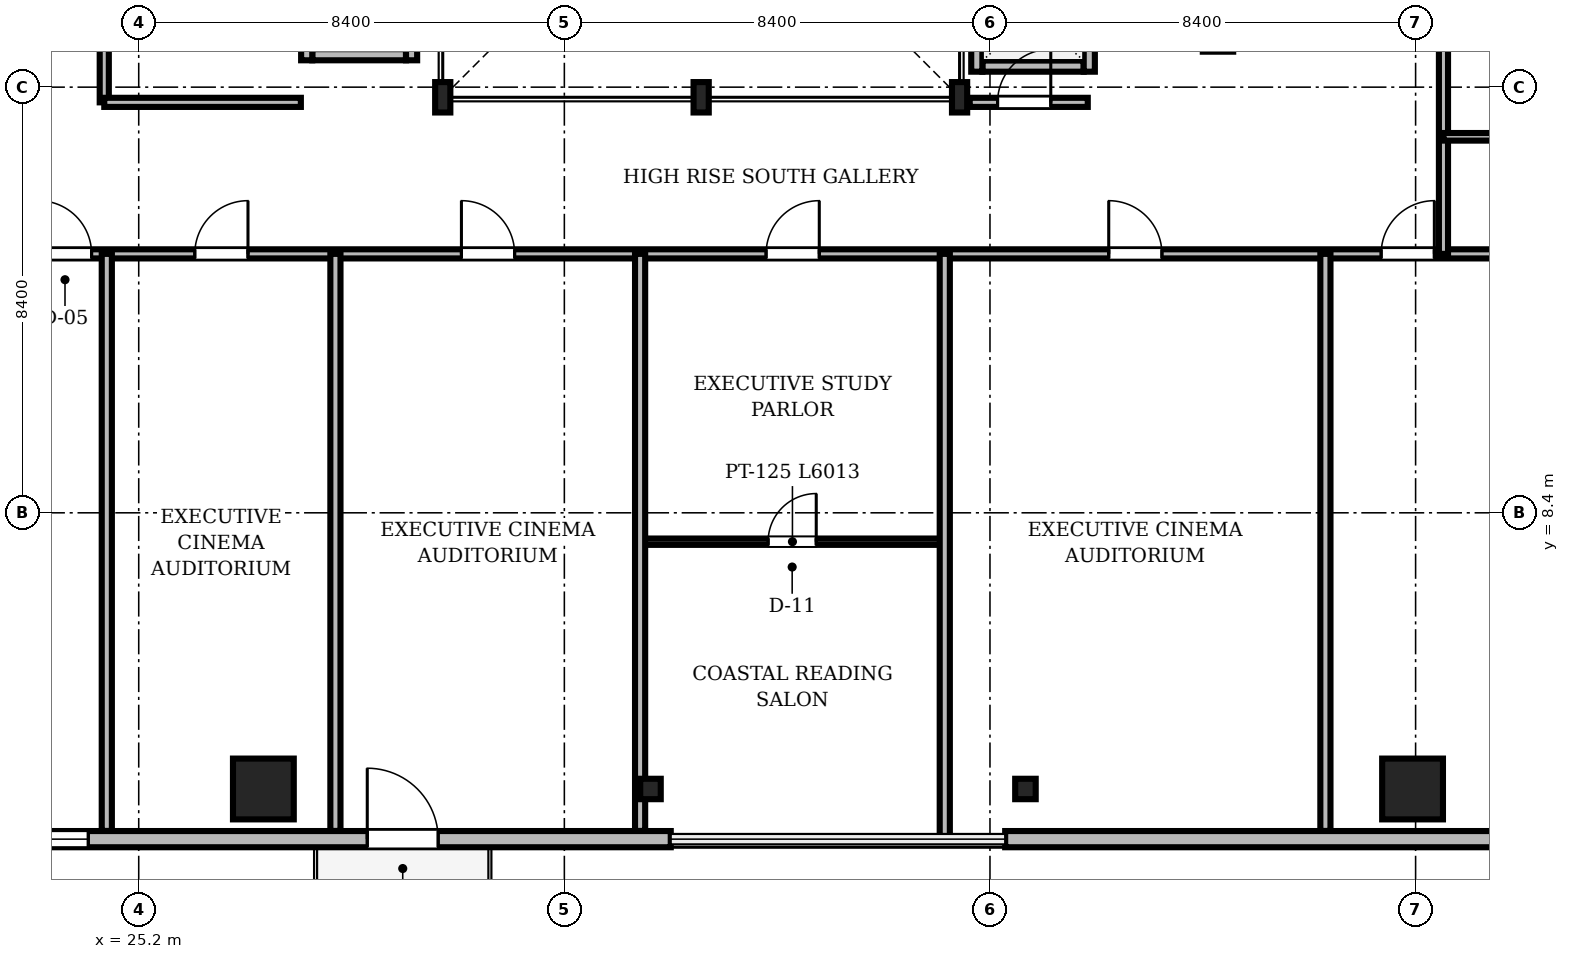
"""IFC4 building model, lengths in metres.
Left out: names, types, materials, properties, quantities, classifications, styles, units other than length and angle.
Written with IfcOpenShell. Run it as: python <this file> out.ifc"""

import sys

from ifc_helpers import new_model, si_unit, direction, frame, frame_2d, origin, origin_2d, place, context, subcontext, project, spatial, rectangle, i_section, extrude, source, transform, mapped, element, fill, save


model = new_model("IFC4")
c1 = context("Model", 3, precision=1e-05, world=origin(), true_north=direction((0.0, 1.0)))
c2 = subcontext(c1, "Body", "Model", "MODEL_VIEW")
j1 = project(units=[si_unit("LENGTHUNIT", "METRE"), si_unit("PLANEANGLEUNIT", "RADIAN")], contexts=[c1])
p1 = place(None, origin())
s1 = spatial("IfcSite", under=j1, at=p1, CompositionType="ELEMENT")
p2 = place(p1, origin())
s2 = spatial("IfcBuilding", under=s1, at=p2, CompositionType="ELEMENT")
p3 = place(p2, frame((0.0, 0.0, 250.6)))
s3 = spatial("IfcBuildingStorey", under=s2, at=p3, CompositionType="ELEMENT", Elevation=250.6)
m1 = source(origin(), c2, "Body", "SweptSolid", [
    extrude(i_section(OverallWidth=0.3, OverallDepth=0.6, WebThickness=0.015, FlangeThickness=0.03, FilletRadius=0.027, at=origin_2d()), origin(), (0.0, 0.0, 1.0), 3.65),
])
for number, where, z_axis, x_axis in (
    (1, (31.2, 16.6, 0.0), (0.0, 0.0, 1.0), (1.0, 0.0, 0.0)),
    (2, (36.3, 16.6, 0.0), (0.0, 0.0, 1.0), (1.0, 0.0, 0.0)),
    (3, (41.4, 16.6, 0.0), (0.0, 0.0, 1.0), (1.0, 0.0, 0.0)),
):
    element("IfcColumn", number, at=place(p3, frame(where, z_axis=z_axis, x_axis=x_axis)), inside=s3, PredefinedType="COLUMN", context=c2, shape_type="MappedRepresentation", body=[
        mapped(m1, transform((0.0, 0.0, 0.0), scale=1.0)),
    ])
m2 = source(origin(), c2, "Body", "SweptSolid", [
    extrude(rectangle(XDim=1.2, YDim=1.2, at=origin_2d()), origin(), (0.0, 0.0, 1.0), 3.65),
])
for number, where, z_axis, x_axis in (
    (4, (27.66, 2.95, 0.0), (0.0, 0.0, 1.0), (1.0, 0.0, 0.0)),
    (5, (50.34, 2.95, 0.0), (0.0, 0.0, 1.0), (1.0, 0.0, 0.0)),
):
    element("IfcColumn", number, at=place(p3, frame(where, z_axis=z_axis, x_axis=x_axis)), inside=s3, PredefinedType="COLUMN", context=c2, shape_type="MappedRepresentation", body=[
        mapped(m2, transform((0.0, 0.0, 0.0), scale=1.0)),
    ])
m3 = source(origin(), c2, "Body", "SweptSolid", [
    extrude(i_section(OverallWidth=0.405, OverallDepth=0.403, WebThickness=0.018, FlangeThickness=0.028, FilletRadius=0.015, at=origin_2d()), origin(), (0.0, 0.0, 1.0), 3.65),
])
for number, where, z_axis, x_axis in (
    (6, (35.3, 2.95, 0.0), (0.0, 0.0, 1.0), (1.0, 0.0, 0.0)),
    (7, (42.7, 2.95, 0.0), (0.0, 0.0, 1.0), (1.0, 0.0, 0.0)),
):
    element("IfcColumn", number, at=place(p3, frame(where, z_axis=z_axis, x_axis=x_axis)), inside=s3, PredefinedType="COLUMN", context=c2, shape_type="MappedRepresentation", body=[
        mapped(m3, transform((0.0, 0.0, 0.0), scale=1.0)),
    ])
m4 = source(origin(), c2, "Body", "SweptSolid", [
    extrude(rectangle(XDim=15.6, YDim=0.32, at=frame_2d((7.8, 0.0))), origin(), (0.0, 0.0, 1.0), 3.65),
])
p4 = place(p3, frame((20.1, 1.96, 0.0), z_axis=(0.0, 0.0, 1.0), x_axis=(1.0, 0.0, 0.0)))
e8 = element("IfcWall", 8, at=p4, inside=s3, PredefinedType="SOLIDWALL", context=c2, shape_type="MappedRepresentation", body=[
    mapped(m4, transform((0.0, 0.0, 0.0), scale=1.0)),
])
m5 = source(origin(), c2, "Body", "SweptSolid", [
    extrude(rectangle(XDim=1.4, YDim=2.3, at=frame_2d((0.7, 1.15))), frame((0.0, 0.17, 0.0), z_axis=(0.0, -1.0, 0.0), x_axis=(1.0, 0.0, 0.0)), (0.0, 0.0, 1.0), 0.34),
])
p5 = place(p4, frame((9.61, 0.0, 0.0)))
e9 = element("IfcOpeningElement", 9, at=p5, cuts=e8, PredefinedType="OPENING", context=c2, shape_type="MappedRepresentation", body=[
    mapped(m5, transform((0.0, 0.0, 0.0), scale=1.0)),
])
m6 = source(origin(), c2, "Body", "SweptSolid", [
    extrude(rectangle(XDim=1.8, YDim=2.4, at=frame_2d((0.9, 1.2))), frame((0.0, 0.17, 0.0), z_axis=(0.0, -1.0, 0.0), x_axis=(1.0, 0.0, 0.0)), (0.0, 0.0, 1.0), 0.34),
])
p6 = place(p4, frame((2.305, 0.0, 0.72)))
e10 = element("IfcOpeningElement", 10, at=p6, cuts=e8, PredefinedType="OPENING", context=c2, shape_type="MappedRepresentation", body=[
    mapped(m6, transform((0.0, 0.0, 0.0), scale=1.0)),
])
p7 = place(p3, frame((42.3, 1.96, 0.0), z_axis=(0.0, 0.0, 1.0), x_axis=(1.0, 0.0, 0.0)))
e11 = element("IfcWall", 11, at=p7, inside=s3, PredefinedType="SOLIDWALL", context=c2, shape_type="MappedRepresentation", body=[
    mapped(m4, transform((0.0, 0.0, 0.0), scale=1.0)),
])
p8 = place(p7, frame((10.595, 0.0, 0.72)))
e12 = element("IfcOpeningElement", 12, at=p8, cuts=e11, PredefinedType="OPENING", context=c2, shape_type="MappedRepresentation", body=[
    mapped(m6, transform((0.0, 0.0, 0.0), scale=1.0)),
])
m7 = source(origin(), c2, "Body", "SweptSolid", [
    extrude(rectangle(XDim=2.0, YDim=0.22, at=frame_2d((1.0, 0.0))), origin(), (0.0, 0.0, 1.0), 3.65),
])
p9 = place(p3, frame((41.85, 17.215, 0.0), z_axis=(0.0, 0.0, 1.0), x_axis=(1.0, 0.0, 0.0)))
e13 = element("IfcWall", 13, at=p9, inside=s3, PredefinedType="SOLIDWALL", context=c2, shape_type="MappedRepresentation", body=[
    mapped(m7, transform((0.0, 0.0, 0.0), scale=1.0)),
])
m8 = source(origin(), c2, "Body", "SweptSolid", [
    extrude(rectangle(XDim=2.19, YDim=0.22, at=frame_2d((1.095, 0.0))), origin(), (0.0, 0.0, 1.0), 3.65),
])
p10 = place(p3, frame((41.74, 17.105, 0.0), z_axis=(0.0, 0.0, 1.0), x_axis=(0.0, 1.0, 0.0)))
e14 = element("IfcWall", 14, at=p10, inside=s3, PredefinedType="SOLIDWALL", context=c2, shape_type="MappedRepresentation", body=[
    mapped(m8, transform((0.0, 0.0, 0.0), scale=1.0)),
])
p11 = place(p3, frame((43.96, 17.105, 0.0), z_axis=(0.0, 0.0, 1.0), x_axis=(0.0, 1.0, 0.0)))
e15 = element("IfcWall", 15, at=p11, inside=s3, PredefinedType="SOLIDWALL", context=c2, shape_type="MappedRepresentation", body=[
    mapped(m8, transform((0.0, 0.0, 0.0), scale=1.0)),
])
m9 = source(origin(), c2, "Body", "SweptSolid", [
    extrude(rectangle(XDim=1.1, YDim=2.2, at=frame_2d((0.55, 1.1))), frame((0.0, 0.12, 0.0), z_axis=(0.0, -1.0, 0.0), x_axis=(1.0, 0.0, 0.0)), (0.0, 0.0, 1.0), 0.24),
])
p12 = place(p11, frame((0.545, 0.0, 0.0)))
e16 = element("IfcOpeningElement", 16, at=p12, cuts=e15, PredefinedType="OPENING", context=c2, shape_type="MappedRepresentation", body=[
    mapped(m9, transform((0.0, 0.0, 0.0), scale=1.0)),
])
m10 = source(origin(), c2, "Body", "SweptSolid", [
    extrude(rectangle(XDim=1.85, YDim=0.22, at=frame_2d((0.925, 0.0))), origin(), (0.0, 0.0, 1.0), 3.65),
])
p13 = place(p3, frame((28.625, 17.44, 0.0), z_axis=(0.0, 0.0, 1.0), x_axis=(1.0, 0.0, 0.0)))
e17 = element("IfcWall", 17, at=p13, inside=s3, PredefinedType="SOLIDWALL", context=c2, shape_type="MappedRepresentation", body=[
    mapped(m10, transform((0.0, 0.0, 0.0), scale=1.0)),
])
m11 = source(origin(), c2, "Body", "SweptSolid", [
    extrude(rectangle(XDim=2.54, YDim=0.22, at=frame_2d((1.27, 0.0))), origin(), (0.0, 0.0, 1.0), 3.65),
])
for number, where, z_axis, x_axis in (
    (18, (28.515, 17.33, 0.0), (0.0, 0.0, 1.0), (0.0, 1.0, 0.0)),
    (19, (30.585, 17.33, 0.0), (0.0, 0.0, 1.0), (0.0, 1.0, 0.0)),
):
    element("IfcWall", number, at=place(p3, frame(where, z_axis=z_axis, x_axis=x_axis)), inside=s3, PredefinedType="SOLIDWALL", context=c2, shape_type="MappedRepresentation", body=[
        mapped(m11, transform((0.0, 0.0, 0.0), scale=1.0)),
    ])
m12 = source(origin(), c2, "Body", "SweptSolid", [
    extrude(rectangle(XDim=46.156, YDim=0.18, at=frame_2d((23.078, 0.0))), origin(), (0.0, 0.0, 1.0), 2.892),
])
p14 = place(p3, frame((15.922, 13.51, 0.0), z_axis=(0.0, 0.0, 1.0), x_axis=(1.0, 0.0, 0.0)))
e20 = element("IfcWall", 20, at=p14, inside=s3, PredefinedType="PARTITIONING", context=c2, shape_type="MappedRepresentation", body=[
    mapped(m12, transform((0.0, 0.0, 0.0), scale=1.0)),
])
m13 = source(origin(), c2, "Body", "SweptSolid", [
    extrude(rectangle(XDim=1.05, YDim=2.2, at=frame_2d((0.525, 1.1))), frame((0.0, 0.1, 0.0), z_axis=(0.0, -1.0, 0.0), x_axis=(1.0, 0.0, 0.0)), (0.0, 0.0, 1.0), 0.2),
])
p15 = place(p14, frame((7.298, 0.0, 0.0)))
e21 = element("IfcOpeningElement", 21, at=p15, cuts=e20, PredefinedType="OPENING", context=c2, shape_type="MappedRepresentation", body=[
    mapped(m13, transform((0.0, 0.0, 0.0), scale=1.0)),
])
p16 = place(p14, frame((10.384, 0.0, 0.0)))
e22 = element("IfcOpeningElement", 22, at=p16, cuts=e20, PredefinedType="OPENING", context=c2, shape_type="MappedRepresentation", body=[
    mapped(m13, transform((0.0, 0.0, 0.0), scale=1.0)),
])
p17 = place(p14, frame((15.647, 0.0, 0.0)))
e23 = element("IfcOpeningElement", 23, at=p17, cuts=e20, PredefinedType="OPENING", context=c2, shape_type="MappedRepresentation", body=[
    mapped(m13, transform((0.0, 0.0, 0.0), scale=1.0)),
])
p18 = place(p14, frame((21.659, 0.0, 0.0)))
e24 = element("IfcOpeningElement", 24, at=p18, cuts=e20, PredefinedType="OPENING", context=c2, shape_type="MappedRepresentation", body=[
    mapped(m13, transform((0.0, 0.0, 0.0), scale=1.0)),
])
p19 = place(p14, frame((28.422, 0.0, 0.0)))
e25 = element("IfcOpeningElement", 25, at=p19, cuts=e20, PredefinedType="OPENING", context=c2, shape_type="MappedRepresentation", body=[
    mapped(m13, transform((0.0, 0.0, 0.0), scale=1.0)),
])
p20 = place(p14, frame((33.798, 0.0, 0.0)))
e26 = element("IfcOpeningElement", 26, at=p20, cuts=e20, PredefinedType="OPENING", context=c2, shape_type="MappedRepresentation", body=[
    mapped(m13, transform((0.0, 0.0, 0.0), scale=1.0)),
])
m14 = source(origin(), c2, "Body", "SweptSolid", [
    extrude(rectangle(XDim=27.59, YDim=0.18, at=frame_2d((13.795, 0.0))), origin(), (0.0, 0.0, 1.0), 3.092),
])
p21 = place(p3, frame((50.95, 13.51, 0.0), z_axis=(0.0, 0.0, 1.0), x_axis=(0.0, 1.0, 0.0)))
e27 = element("IfcWall", 27, at=p21, inside=s3, PredefinedType="PARTITIONING", context=c2, shape_type="MappedRepresentation", body=[
    mapped(m14, transform((0.0, 0.0, 0.0), scale=1.0)),
])
p22 = place(p21, frame((4.086, 0.0, 0.0)))
e28 = element("IfcOpeningElement", 28, at=p22, cuts=e27, PredefinedType="OPENING", context=c2, shape_type="MappedRepresentation", body=[
    mapped(m13, transform((0.0, 0.0, 0.0), scale=1.0)),
])
p23 = place(p21, frame((9.744, 0.0, 0.0)))
e29 = element("IfcOpeningElement", 29, at=p23, cuts=e27, PredefinedType="OPENING", context=c2, shape_type="MappedRepresentation", body=[
    mapped(m13, transform((0.0, 0.0, 0.0), scale=1.0)),
])
p24 = place(p21, frame((17.771, 0.0, 0.0)))
e30 = element("IfcOpeningElement", 30, at=p24, cuts=e27, PredefinedType="OPENING", context=c2, shape_type="MappedRepresentation", body=[
    mapped(m13, transform((0.0, 0.0, 0.0), scale=1.0)),
])
p25 = place(p21, frame((24.614, 0.0, 0.0)))
e31 = element("IfcOpeningElement", 31, at=p25, cuts=e27, PredefinedType="OPENING", context=c2, shape_type="MappedRepresentation", body=[
    mapped(m13, transform((0.0, 0.0, 0.0), scale=1.0)),
])
m15 = source(origin(), c2, "Body", "SweptSolid", [
    extrude(rectangle(XDim=6.013, YDim=0.125, at=frame_2d((3.006, 0.0))), origin(), (0.0, 0.0, 1.0), 3.092),
])
p26 = place(p3, frame((35.095, 7.83, 0.0), z_axis=(0.0, 0.0, 1.0), x_axis=(1.0, 0.0, 0.0)))
e32 = element("IfcWall", 32, at=p26, inside=s3, PredefinedType="PARTITIONING", context=c2, shape_type="MappedRepresentation", body=[
    mapped(m15, transform((0.0, 0.0, 0.0), scale=1.0)),
])
m16 = source(origin(), c2, "Body", "SweptSolid", [
    extrude(rectangle(XDim=0.95, YDim=2.15, at=frame_2d((0.475, 1.075))), frame((0.0, 0.073, 0.0), z_axis=(0.0, -1.0, 0.0), x_axis=(1.0, 0.0, 0.0)), (0.0, 0.0, 1.0), 0.145),
])
p27 = place(p26, frame((2.526, 0.0, 0.0)))
e33 = element("IfcOpeningElement", 33, at=p27, cuts=e32, PredefinedType="OPENING", context=c2, shape_type="MappedRepresentation", body=[
    mapped(m16, transform((0.0, 0.0, 0.0), scale=1.0)),
])
m17 = source(origin(), c2, "Body", "SweptSolid", [
    extrude(rectangle(XDim=5.4, YDim=0.18, at=frame_2d((2.7, 0.0))), origin(), (0.0, 0.0, 1.0), 3.65),
])
p28 = place(p3, frame((24.52, 16.5, 0.0), z_axis=(0.0, 0.0, 1.0), x_axis=(0.0, 1.0, 0.0)))
e34 = element("IfcWall", 34, at=p28, inside=s3, PredefinedType="PARTITIONING", context=c2, shape_type="MappedRepresentation", body=[
    mapped(m17, transform((0.0, 0.0, 0.0), scale=1.0)),
])
p29 = place(p28, frame((2.0, 0.0, 0.0)))
e35 = element("IfcOpeningElement", 35, at=p29, cuts=e34, PredefinedType="OPENING", context=c2, shape_type="MappedRepresentation", body=[
    mapped(m13, transform((0.0, 0.0, 0.0), scale=1.0)),
])
m18 = source(origin(), c2, "Body", "SweptSolid", [
    extrude(rectangle(XDim=2.33, YDim=0.18, at=frame_2d((1.165, 0.0))), origin(), (0.0, 0.0, 1.0), 3.092),
])
p30 = place(p3, frame((41.6, 16.5, 0.0), z_axis=(0.0, 0.0, 1.0), x_axis=(1.0, 0.0, 0.0)))
e36 = element("IfcWall", 36, at=p30, inside=s3, PredefinedType="PARTITIONING", context=c2, shape_type="MappedRepresentation", body=[
    mapped(m18, transform((0.0, 0.0, 0.0), scale=1.0)),
])
p31 = place(p30, frame((0.55, 0.0, 0.0)))
e37 = element("IfcOpeningElement", 37, at=p31, cuts=e36, PredefinedType="OPENING", context=c2, shape_type="MappedRepresentation", body=[
    mapped(m13, transform((0.0, 0.0, 0.0), scale=1.0)),
])
m19 = source(origin(), c2, "Body", "SweptSolid", [
    extrude(rectangle(XDim=11.388, YDim=0.2, at=frame_2d((5.694, 0.0))), origin(), (0.0, 0.0, 1.0), 2.892),
])
for number, where, z_axis, x_axis in (
    (38, (24.57, 2.122, 0.0), (0.0, 0.0, 1.0), (0.0, 1.0, 0.0)),
    (39, (29.082, 2.122, 0.0), (0.0, 0.0, 1.0), (0.0, 1.0, 0.0)),
    (40, (35.095, 2.122, 0.0), (0.0, 0.0, 1.0), (0.0, 1.0, 0.0)),
):
    element("IfcWall", number, at=place(p3, frame(where, z_axis=z_axis, x_axis=x_axis)), inside=s3, PredefinedType="PARTITIONING", context=c2, shape_type="MappedRepresentation", body=[
        mapped(m19, transform((0.0, 0.0, 0.0), scale=1.0)),
    ])
m20 = source(origin(), c2, "Body", "SweptSolid", [
    extrude(rectangle(XDim=11.58, YDim=0.2, at=frame_2d((5.79, 0.0))), origin(), (0.0, 0.0, 1.0), 2.892),
])
p32 = place(p3, frame((41.108, 1.93, 0.0), z_axis=(0.0, 0.0, 1.0), x_axis=(0.0, 1.0, 0.0)))
e41 = element("IfcWall", 41, at=p32, inside=s3, PredefinedType="PARTITIONING", context=c2, shape_type="MappedRepresentation", body=[
    mapped(m20, transform((0.0, 0.0, 0.0), scale=1.0)),
])
p33 = place(p3, frame((48.62, 2.122, 0.0), z_axis=(0.0, 0.0, 1.0), x_axis=(0.0, 1.0, 0.0)))
e42 = element("IfcWall", 42, at=p33, inside=s3, PredefinedType="PARTITIONING", context=c2, shape_type="MappedRepresentation", body=[
    mapped(m19, transform((0.0, 0.0, 0.0), scale=1.0)),
])
m21 = source(origin(), c2, "Body", "SweptSolid", [
    extrude(rectangle(XDim=3.88, YDim=0.18, at=frame_2d((1.94, 0.0))), origin(), (0.0, 0.0, 1.0), 3.65),
])
p34 = place(p3, frame((24.52, 16.5, 0.0), z_axis=(0.0, 0.0, 1.0), x_axis=(1.0, 0.0, 0.0)))
e43 = element("IfcWall", 43, at=p34, inside=s3, PredefinedType="PARTITIONING", context=c2, shape_type="MappedRepresentation", body=[
    mapped(m21, transform((0.0, 0.0, 0.0), scale=1.0)),
])
m22 = source(origin(), c2, "Body", "SweptSolid", [
    extrude(rectangle(XDim=2.36, YDim=0.15, at=frame_2d((1.18, 0.0))), origin(), (0.0, 0.0, 1.0), 3.65),
])
p35 = place(p3, frame((50.95, 15.82, 0.0), z_axis=(0.0, 0.0, 1.0), x_axis=(1.0, 0.0, 0.0)))
e44 = element("IfcWall", 44, at=p35, inside=s3, PredefinedType="PARTITIONING", context=c2, shape_type="MappedRepresentation", body=[
    mapped(m22, transform((0.0, 0.0, 0.0), scale=1.0)),
])
m23 = source(origin(), c2, "Body", "SweptSolid", [
    extrude(rectangle(XDim=1.4, YDim=2.3, at=frame_2d((0.7, 1.15))), frame((0.0, 0.025, 0.0), z_axis=(0.0, -1.0, 0.0), x_axis=(1.0, 0.0, 0.0)), (0.0, 0.0, 1.0), 0.05),
])
p36 = place(p5, frame((1.4, 0.0, 0.0), z_axis=(0.0, 0.0, 1.0), x_axis=(-1.0, 0.0, 0.0)))
e45 = element("IfcDoor", 45, at=p36, inside=s3, OperationType="DOUBLE_DOOR_SLIDING", PredefinedType="DOOR", context=c2, shape_type="MappedRepresentation", body=[
    mapped(m23, transform((0.0, 0.0, 0.0), scale=1.0)),
])
fill(e9, e45)
m24 = source(origin(), c2, "Body", "SweptSolid", [
    extrude(rectangle(XDim=1.8, YDim=2.4, at=frame_2d((0.9, 1.2))), frame((0.0, 0.03, 0.0), z_axis=(0.0, -1.0, 0.0), x_axis=(1.0, 0.0, 0.0)), (0.0, 0.0, 1.0), 0.06),
])
p37 = place(p6, origin())
e46 = element("IfcWindow", 46, at=p37, inside=s3, PartitioningType="SINGLE_PANEL", PredefinedType="WINDOW", context=c2, shape_type="MappedRepresentation", body=[
    mapped(m24, transform((0.0, 0.0, 0.0), scale=1.0)),
])
fill(e10, e46)
m25 = source(origin(), c2, "Body", "SweptSolid", [
    extrude(rectangle(XDim=1.05, YDim=2.2, at=frame_2d((0.525, 1.1))), frame((0.0, 0.025, 0.0), z_axis=(0.0, -1.0, 0.0), x_axis=(1.0, 0.0, 0.0)), (0.0, 0.0, 1.0), 0.05),
])
p38 = place(p15, origin())
e47 = element("IfcDoor", 47, at=p38, inside=s3, OperationType="SINGLE_SWING_LEFT", PredefinedType="DOOR", context=c2, shape_type="MappedRepresentation", body=[
    mapped(m25, transform((0.0, 0.0, 0.0), scale=1.0)),
])
fill(e21, e47)
p39 = place(p16, origin())
e48 = element("IfcDoor", 48, at=p39, inside=s3, OperationType="SINGLE_SWING_RIGHT", PredefinedType="DOOR", context=c2, shape_type="MappedRepresentation", body=[
    mapped(m25, transform((0.0, 0.0, 0.0), scale=1.0)),
])
fill(e22, e48)
p40 = place(p17, origin())
e49 = element("IfcDoor", 49, at=p40, inside=s3, OperationType="SINGLE_SWING_LEFT", PredefinedType="DOOR", context=c2, shape_type="MappedRepresentation", body=[
    mapped(m25, transform((0.0, 0.0, 0.0), scale=1.0)),
])
fill(e23, e49)
p41 = place(p18, origin())
e50 = element("IfcDoor", 50, at=p41, inside=s3, OperationType="SINGLE_SWING_RIGHT", PredefinedType="DOOR", context=c2, shape_type="MappedRepresentation", body=[
    mapped(m25, transform((0.0, 0.0, 0.0), scale=1.0)),
])
fill(e24, e50)
p42 = place(p19, origin())
e51 = element("IfcDoor", 51, at=p42, inside=s3, OperationType="SINGLE_SWING_LEFT", PredefinedType="DOOR", context=c2, shape_type="MappedRepresentation", body=[
    mapped(m25, transform((0.0, 0.0, 0.0), scale=1.0)),
])
fill(e25, e51)
p43 = place(p20, origin())
e52 = element("IfcDoor", 52, at=p43, inside=s3, OperationType="SINGLE_SWING_RIGHT", PredefinedType="DOOR", context=c2, shape_type="MappedRepresentation", body=[
    mapped(m25, transform((0.0, 0.0, 0.0), scale=1.0)),
])
fill(e26, e52)
m26 = source(origin(), c2, "Body", "SweptSolid", [
    extrude(rectangle(XDim=0.95, YDim=2.15, at=frame_2d((0.475, 1.075))), frame((0.0, 0.025, 0.0), z_axis=(0.0, -1.0, 0.0), x_axis=(1.0, 0.0, 0.0)), (0.0, 0.0, 1.0), 0.05),
])
p44 = place(p27, origin())
e53 = element("IfcDoor", 53, at=p44, inside=s3, OperationType="SINGLE_SWING_RIGHT", PredefinedType="DOOR", context=c2, shape_type="MappedRepresentation", body=[
    mapped(m26, transform((0.0, 0.0, 0.0), scale=1.0)),
])
fill(e33, e53)
p45 = place(p31, origin())
e54 = element("IfcDoor", 54, at=p45, inside=s3, OperationType="SINGLE_SWING_RIGHT", PredefinedType="DOOR", context=c2, shape_type="MappedRepresentation", body=[
    mapped(m25, transform((0.0, 0.0, 0.0), scale=1.0)),
])
fill(e37, e54)
save(model, sys.argv[1])
